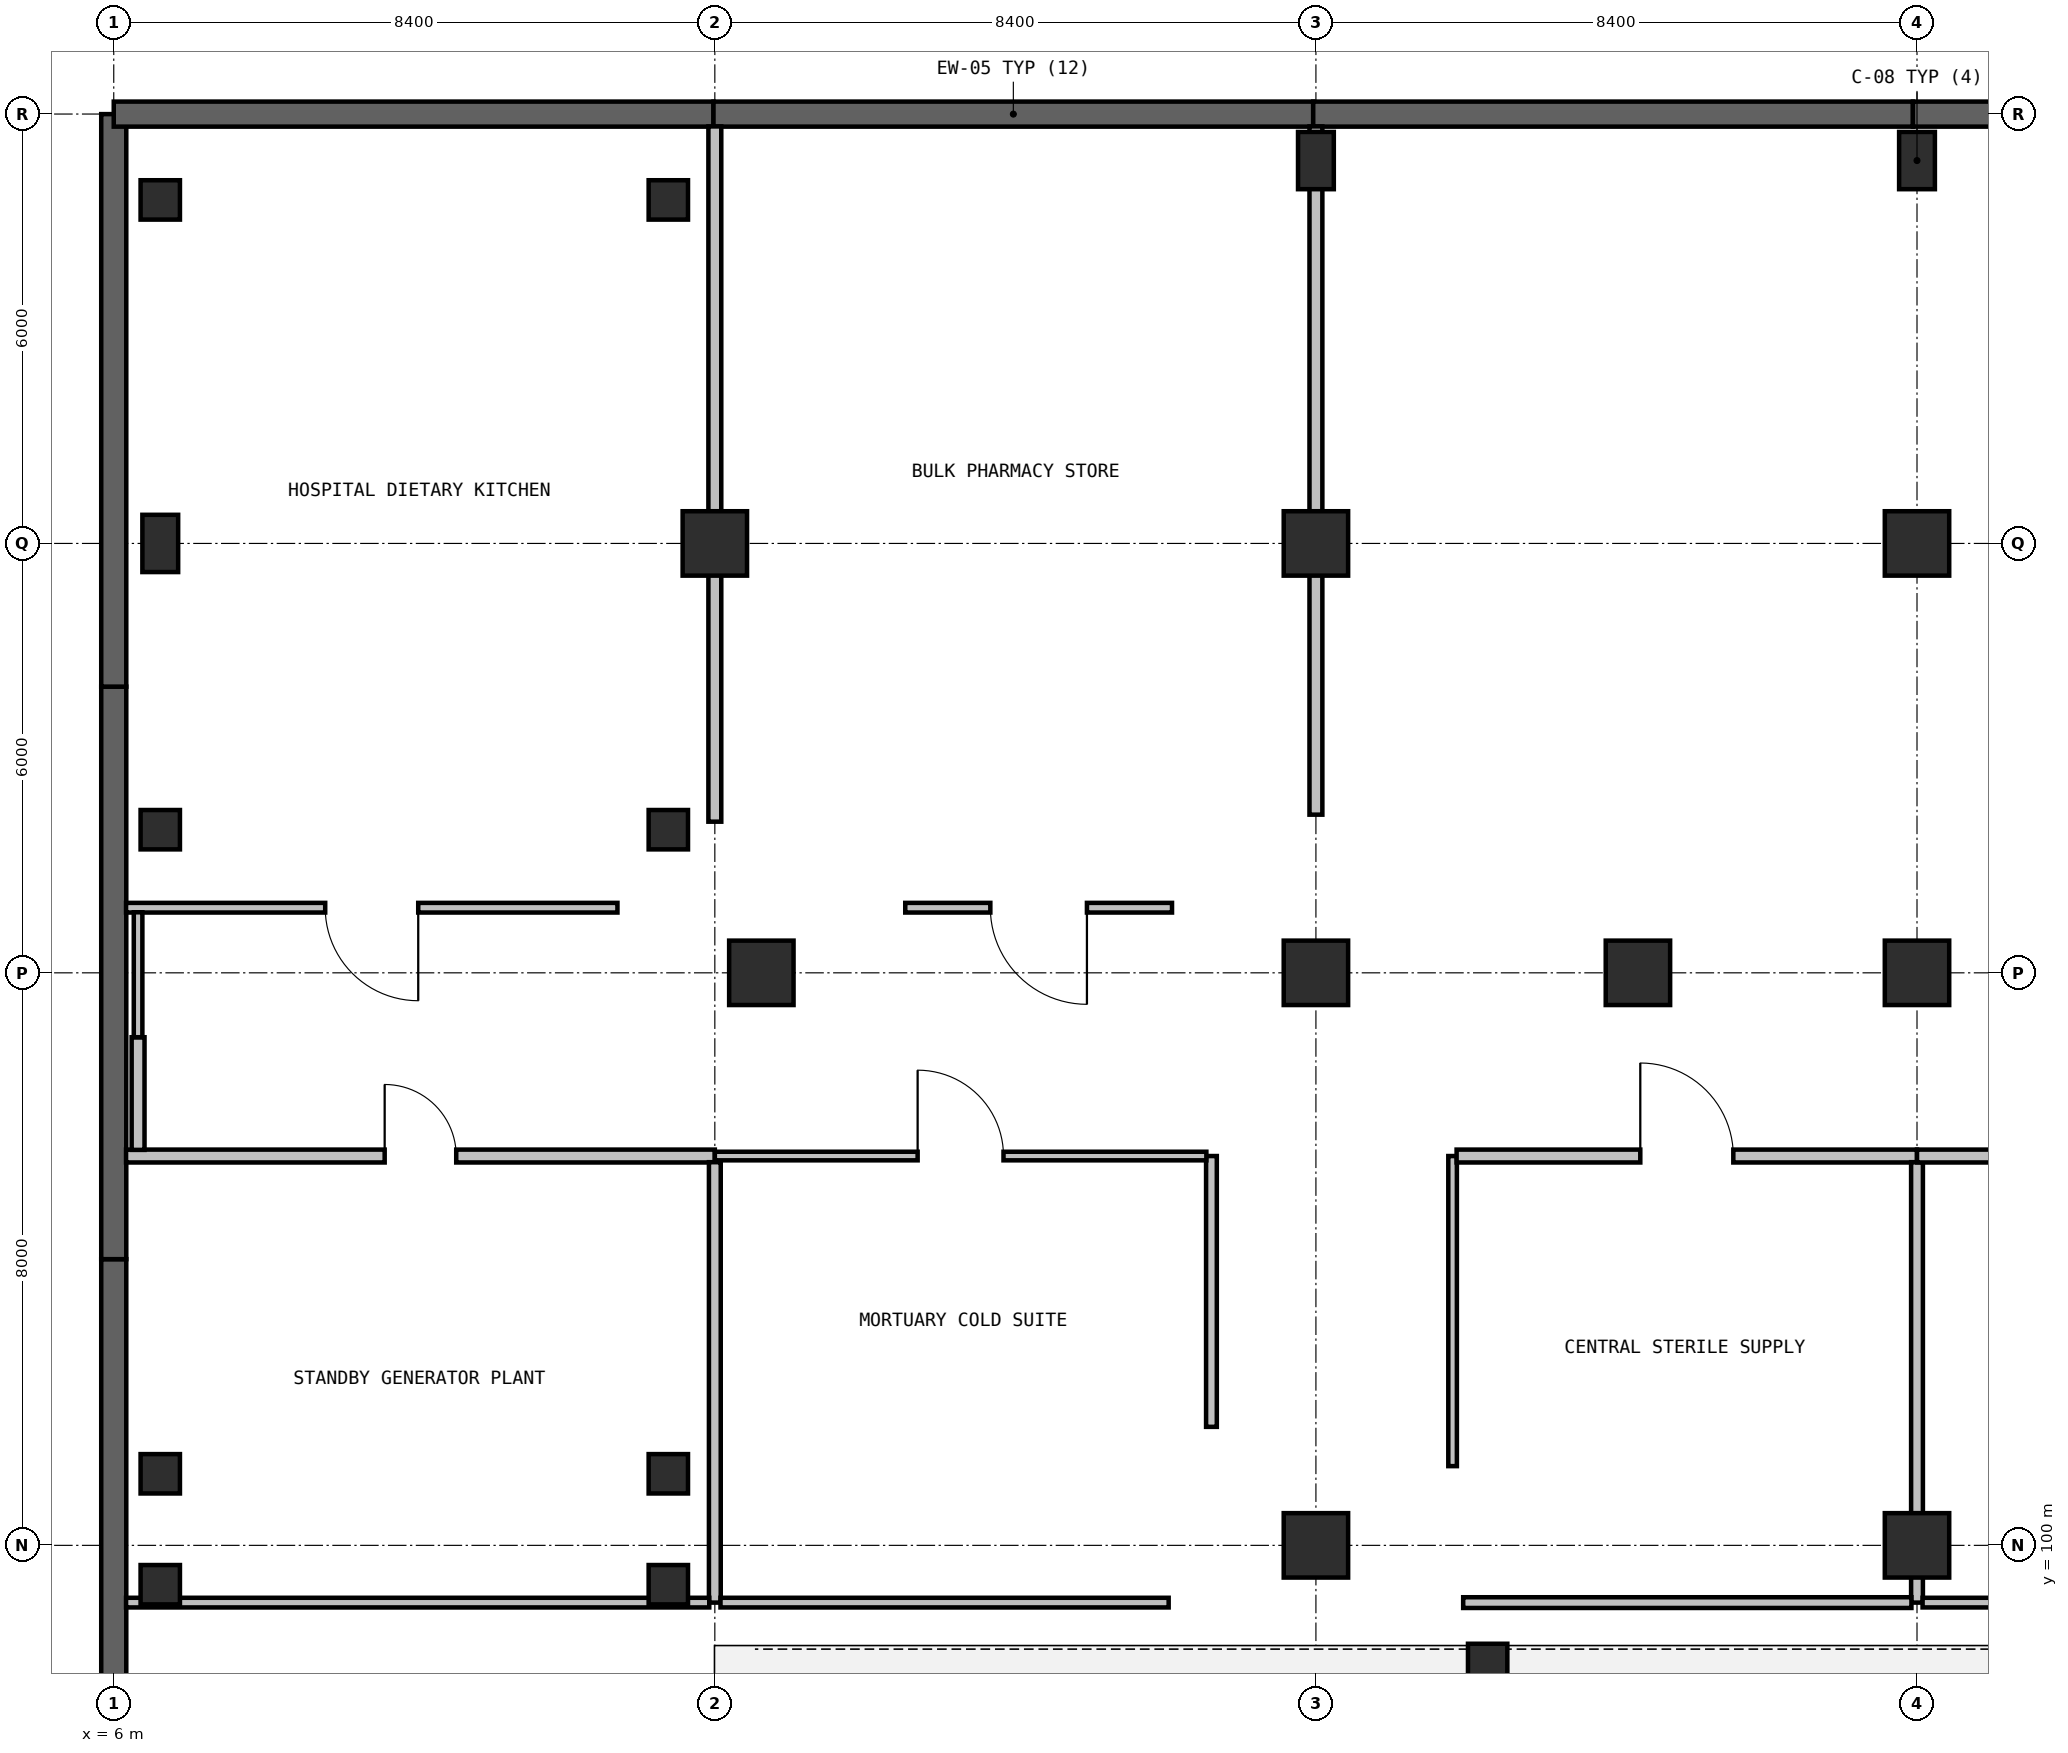
"""IFC4 building model, lengths in metres.
Left out: names, types, materials, properties, quantities, classifications, styles, units other than length and angle.
Written with IfcOpenShell. Run it as: python <this file> out.ifc"""

import sys

from ifc_helpers import new_model, si_unit, direction, frame, frame_2d, origin, origin_2d, place, context, subcontext, project, spatial, rectangle, extrude, element, fill, save


model = new_model("IFC4")
c1 = context("Model", 3, precision=1e-05, world=origin(), true_north=direction((0.0, 1.0)))
c2 = subcontext(c1, "Body", "Model", "MODEL_VIEW")
j1 = project(units=[si_unit("LENGTHUNIT", "METRE"), si_unit("PLANEANGLEUNIT", "RADIAN")], contexts=[c1])
p1 = place(None, origin())
s1 = spatial("IfcSite", under=j1, at=p1, CompositionType="ELEMENT")
p2 = place(p1, origin())
s2 = spatial("IfcBuilding", under=s1, at=p2, CompositionType="ELEMENT")
p3 = place(p2, frame((0.0, 0.0, -4.8)))
s3 = spatial("IfcBuildingStorey", under=s2, at=p3, CompositionType="ELEMENT", Elevation=-4.8)
for number, where, z_axis, x_axis in (
    (1, (6.65, 99.45, 0.0), (0.0, 0.0, 1.0), (1.0, 0.0, 0.0)),
    (2, (6.65, 101.0, 0.0), (0.0, 0.0, 1.0), (1.0, 0.0, 0.0)),
    (3, (6.65, 110.0, 0.0), (0.0, 0.0, 1.0), (1.0, 0.0, 0.0)),
    (4, (6.65, 118.8, 0.0), (0.0, 0.0, 1.0), (1.0, 0.0, 0.0)),
    (5, (13.75, 99.45, 0.0), (0.0, 0.0, 1.0), (1.0, 0.0, 0.0)),
    (6, (13.75, 101.0, 0.0), (0.0, 0.0, 1.0), (1.0, 0.0, 0.0)),
    (7, (13.75, 110.0, 0.0), (0.0, 0.0, 1.0), (1.0, 0.0, 0.0)),
    (8, (13.75, 118.8, 0.0), (0.0, 0.0, 1.0), (1.0, 0.0, 0.0)),
):
    element("IfcColumn", number, at=place(p3, frame(where, z_axis=z_axis, x_axis=x_axis)), inside=s3, PredefinedType="COLUMN", context=c2, shape_type="SweptSolid", body=[
        extrude(rectangle(XDim=0.55, YDim=0.55, at=origin_2d()), origin(), (0.0, 0.0, 1.0), 4.555),
    ])
p4 = place(p3, frame((25.2, 98.35, 0.0), z_axis=(0.0, 0.0, 1.0), x_axis=(1.0, 0.0, 0.0)))
e9 = element("IfcColumn", 9, at=p4, inside=s3, PredefinedType="COLUMN", context=c2, shape_type="SweptSolid", body=[
    extrude(rectangle(XDim=0.55, YDim=0.55, at=origin_2d()), origin(), (0.0, 0.0, 1.0), 2.947),
])
p5 = place(p3, frame((27.3, 108.0, 0.0), z_axis=(0.0, 0.0, 1.0), x_axis=(1.0, 0.0, 0.0)))
e10 = element("IfcColumn", 10, at=p5, inside=s3, PredefinedType="COLUMN", context=c2, shape_type="SweptSolid", body=[
    extrude(rectangle(XDim=0.9, YDim=0.9, at=origin_2d()), origin(), (0.0, 0.0, 1.0), 4.8),
])
p6 = place(p3, frame((6.65, 114.0, 0.0), z_axis=(0.0, 0.0, 1.0), x_axis=(1.0, 0.0, 0.0)))
e11 = element("IfcColumn", 11, at=p6, inside=s3, PredefinedType="COLUMN", context=c2, shape_type="SweptSolid", body=[
    extrude(rectangle(XDim=0.5, YDim=0.8, at=origin_2d()), origin(), (0.0, 0.0, 1.0), 4.555),
])
p7 = place(p3, frame((14.4, 114.0, 0.0), z_axis=(0.0, 0.0, 1.0), x_axis=(1.0, 0.0, 0.0)))
e12 = element("IfcColumn", 12, at=p7, inside=s3, PredefinedType="COLUMN", context=c2, shape_type="SweptSolid", body=[
    extrude(rectangle(XDim=0.9, YDim=0.9, at=origin_2d()), origin(), (0.0, 0.0, 1.0), 4.45),
])
for number, where, z_axis, x_axis in (
    (13, (15.05, 108.0, 0.0), (0.0, 0.0, 1.0), (1.0, 0.0, 0.0)),
    (14, (22.8, 100.0, 0.0), (0.0, 0.0, 1.0), (1.0, 0.0, 0.0)),
    (15, (22.8, 108.0, 0.0), (0.0, 0.0, 1.0), (1.0, 0.0, 0.0)),
    (16, (22.8, 114.0, 0.0), (0.0, 0.0, 1.0), (1.0, 0.0, 0.0)),
):
    element("IfcColumn", number, at=place(p3, frame(where, z_axis=z_axis, x_axis=x_axis)), inside=s3, PredefinedType="COLUMN", context=c2, shape_type="SweptSolid", body=[
        extrude(rectangle(XDim=0.9, YDim=0.9, at=origin_2d()), origin(), (0.0, 0.0, 1.0), 4.8),
    ])
p8 = place(p3, frame((22.8, 119.35, 0.0), z_axis=(0.0, 0.0, 1.0), x_axis=(1.0, 0.0, 0.0)))
e17 = element("IfcColumn", 17, at=p8, inside=s3, PredefinedType="COLUMN", context=c2, shape_type="SweptSolid", body=[
    extrude(rectangle(XDim=0.5, YDim=0.8, at=origin_2d()), origin(), (0.0, 0.0, 1.0), 4.8),
])
for number, where, z_axis, x_axis in (
    (18, (31.2, 100.0, 0.0), (0.0, 0.0, 1.0), (1.0, 0.0, 0.0)),
    (19, (31.2, 108.0, 0.0), (0.0, 0.0, 1.0), (1.0, 0.0, 0.0)),
    (20, (31.2, 114.0, 0.0), (0.0, 0.0, 1.0), (1.0, 0.0, 0.0)),
):
    element("IfcColumn", number, at=place(p3, frame(where, z_axis=z_axis, x_axis=x_axis)), inside=s3, PredefinedType="COLUMN", context=c2, shape_type="SweptSolid", body=[
        extrude(rectangle(XDim=0.9, YDim=0.9, at=origin_2d()), origin(), (0.0, 0.0, 1.0), 4.8),
    ])
p9 = place(p3, frame((31.2, 119.35, 0.0), z_axis=(0.0, 0.0, 1.0), x_axis=(1.0, 0.0, 0.0)))
e21 = element("IfcColumn", 21, at=p9, inside=s3, PredefinedType="COLUMN", context=c2, shape_type="SweptSolid", body=[
    extrude(rectangle(XDim=0.5, YDim=0.8, at=origin_2d()), origin(), (0.0, 0.0, 1.0), 4.8),
])
for number, where, z_axis, x_axis in (
    (22, (6.0, 95.999, 0.0), (0.0, 0.0, 1.0), (0.0, 1.0, 0.0)),
    (23, (6.0, 103.999, 0.0), (0.0, 0.0, 1.0), (0.0, 1.0, 0.0)),
    (24, (6.0, 111.999, 0.0), (0.0, 0.0, 1.0), (0.0, 1.0, 0.0)),
):
    element("IfcWall", number, at=place(p3, frame(where, z_axis=z_axis, x_axis=x_axis)), inside=s3, PredefinedType="SHEAR", context=c2, shape_type="SweptSolid", body=[
        extrude(rectangle(XDim=8.0, YDim=0.35, at=frame_2d((4.0, 0.0))), origin(), (0.0, 0.0, 1.0), 4.45),
    ])
p10 = place(p3, frame((6.0, 119.999, 0.0), z_axis=(0.0, 0.0, 1.0), x_axis=(1.0, 0.0, 0.0)))
e25 = element("IfcWall", 25, at=p10, inside=s3, PredefinedType="SHEAR", context=c2, shape_type="SweptSolid", body=[
    extrude(rectangle(XDim=8.381, YDim=0.35, at=frame_2d((4.19, 0.0))), origin(), (0.0, 0.0, 1.0), 4.45),
])
p11 = place(p3, frame((14.381, 119.999, 0.0), z_axis=(0.0, 0.0, 1.0), x_axis=(1.0, 0.0, 0.0)))
e26 = element("IfcWall", 26, at=p11, inside=s3, PredefinedType="SHEAR", context=c2, shape_type="SweptSolid", body=[
    extrude(rectangle(XDim=8.381, YDim=0.35, at=frame_2d((4.19, 0.0))), origin(), (0.0, 0.0, 1.0), 4.45),
])
p12 = place(p3, frame((22.762, 119.999, 0.0), z_axis=(0.0, 0.0, 1.0), x_axis=(1.0, 0.0, 0.0)))
e27 = element("IfcWall", 27, at=p12, inside=s3, PredefinedType="SHEAR", context=c2, shape_type="SweptSolid", body=[
    extrude(rectangle(XDim=8.381, YDim=0.35, at=frame_2d((4.19, 0.0))), origin(), (0.0, 0.0, 1.0), 4.45),
])
p13 = place(p3, frame((31.143, 119.999, 0.0), z_axis=(0.0, 0.0, 1.0), x_axis=(1.0, 0.0, 0.0)))
e28 = element("IfcWall", 28, at=p13, inside=s3, PredefinedType="SHEAR", context=c2, shape_type="SweptSolid", body=[
    extrude(rectangle(XDim=8.381, YDim=0.35, at=frame_2d((4.19, 0.0))), origin(), (0.0, 0.0, 1.0), 4.45),
])
p14 = place(p3, frame((6.172, 105.44, 0.0), z_axis=(0.0, 0.0, 1.0), x_axis=(1.0, 0.0, 0.0)))
e29 = element("IfcWall", 29, at=p14, inside=s3, PredefinedType="PARTITIONING", context=c2, shape_type="SweptSolid", body=[
    extrude(rectangle(XDim=8.228, YDim=0.18, at=frame_2d((4.114, 0.0))), origin(), (0.0, 0.0, 1.0), 4.45),
])
p15 = place(p14, frame((3.614, 0.0, 0.0)))
e30 = element("IfcOpeningElement", 30, at=p15, cuts=e29, PredefinedType="OPENING", context=c2, shape_type="SweptSolid", body=[
    extrude(rectangle(XDim=1.0, YDim=2.15, at=frame_2d((0.5, 1.075))), frame((0.0, 0.1, 0.0), z_axis=(0.0, -1.0, 0.0), x_axis=(1.0, 0.0, 0.0)), (0.0, 0.0, 1.0), 0.2),
])
p16 = place(p3, frame((14.4, 105.354, 0.0), z_axis=(0.0, 0.0, 1.0), x_axis=(0.0, -1.0, 0.0)))
e31 = element("IfcWall", 31, at=p16, inside=s3, PredefinedType="PARTITIONING", context=c2, shape_type="SweptSolid", body=[
    extrude(rectangle(XDim=6.154, YDim=0.165, at=frame_2d((3.077, 0.0))), origin(), (0.0, 0.0, 1.0), 4.45),
])
p17 = place(p3, frame((14.322, 99.2, 0.0), z_axis=(0.0, 0.0, 1.0), x_axis=(-1.0, 0.0, 0.0)))
e32 = element("IfcWall", 32, at=p17, inside=s3, PredefinedType="PARTITIONING", context=c2, shape_type="SweptSolid", body=[
    extrude(rectangle(XDim=8.15, YDim=0.135, at=frame_2d((4.075, 0.0))), origin(), (0.0, 0.0, 1.0), 3.905),
])
p18 = place(p3, frame((6.34, 107.1, 0.0), z_axis=(0.0, 0.0, 1.0), x_axis=(0.0, -1.0, 0.0)))
e33 = element("IfcWall", 33, at=p18, inside=s3, PredefinedType="PARTITIONING", context=c2, shape_type="SweptSolid", body=[
    extrude(rectangle(XDim=1.574, YDim=0.18, at=frame_2d((0.787, 0.0))), origin(), (0.0, 0.0, 1.0), 3.905),
])
p19 = place(p3, frame((21.34, 105.44, 0.0), z_axis=(0.0, 0.0, 1.0), x_axis=(0.0, -1.0, 0.0)))
e34 = element("IfcWall", 34, at=p19, inside=s3, PredefinedType="PARTITIONING", context=c2, shape_type="SweptSolid", body=[
    extrude(rectangle(XDim=3.784, YDim=0.15, at=frame_2d((1.892, 0.0))), origin(), (0.0, 0.0, 1.0), 4.45),
])
p20 = place(p3, frame((20.742, 99.2, 0.0), z_axis=(0.0, 0.0, 1.0), x_axis=(-1.0, 0.0, 0.0)))
e35 = element("IfcWall", 35, at=p20, inside=s3, PredefinedType="PARTITIONING", context=c2, shape_type="SweptSolid", body=[
    extrude(rectangle(XDim=6.263, YDim=0.135, at=frame_2d((3.131, 0.0))), origin(), (0.0, 0.0, 1.0), 4.45),
])
p21 = place(p3, frame((14.4, 105.44, 0.0), z_axis=(0.0, 0.0, 1.0), x_axis=(1.0, 0.0, 0.0)))
e36 = element("IfcWall", 36, at=p21, inside=s3, PredefinedType="PARTITIONING", context=c2, shape_type="SweptSolid", body=[
    extrude(rectangle(XDim=6.869, YDim=0.12, at=frame_2d((3.435, 0.0))), origin(), (0.0, 0.0, 1.0), 4.45),
])
p22 = place(p21, frame((2.834, 0.0, 0.0)))
e37 = element("IfcOpeningElement", 37, at=p22, cuts=e36, PredefinedType="OPENING", context=c2, shape_type="SweptSolid", body=[
    extrude(rectangle(XDim=1.2, YDim=2.15, at=frame_2d((0.6, 1.075))), frame((0.0, 0.07, 0.0), z_axis=(0.0, -1.0, 0.0), x_axis=(1.0, 0.0, 0.0)), (0.0, 0.0, 1.0), 0.14),
])
p23 = place(p3, frame((24.71, 101.107, 0.0), z_axis=(0.0, 0.0, 1.0), x_axis=(0.0, 1.0, 0.0)))
e38 = element("IfcWall", 38, at=p23, inside=s3, PredefinedType="PARTITIONING", context=c2, shape_type="SweptSolid", body=[
    extrude(rectangle(XDim=4.333, YDim=0.12, at=frame_2d((2.167, 0.0))), origin(), (0.0, 0.0, 1.0), 4.45),
])
p24 = place(p3, frame((24.766, 105.44, 0.0), z_axis=(0.0, 0.0, 1.0), x_axis=(1.0, 0.0, 0.0)))
e39 = element("IfcWall", 39, at=p24, inside=s3, PredefinedType="PARTITIONING", context=c2, shape_type="SweptSolid", body=[
    extrude(rectangle(XDim=6.434, YDim=0.18, at=frame_2d((3.217, 0.0))), origin(), (0.0, 0.0, 1.0), 4.45),
])
p25 = place(p24, frame((2.567, 0.0, 0.0)))
e40 = element("IfcOpeningElement", 40, at=p25, cuts=e39, PredefinedType="OPENING", context=c2, shape_type="SweptSolid", body=[
    extrude(rectangle(XDim=1.3, YDim=2.15, at=frame_2d((0.65, 1.075))), frame((0.0, 0.1, 0.0), z_axis=(0.0, -1.0, 0.0), x_axis=(1.0, 0.0, 0.0)), (0.0, 0.0, 1.0), 0.2),
])
p26 = place(p3, frame((31.2, 105.354, 0.0), z_axis=(0.0, 0.0, 1.0), x_axis=(0.0, -1.0, 0.0)))
e41 = element("IfcWall", 41, at=p26, inside=s3, PredefinedType="PARTITIONING", context=c2, shape_type="SweptSolid", body=[
    extrude(rectangle(XDim=6.154, YDim=0.165, at=frame_2d((3.077, 0.0))), origin(), (0.0, 0.0, 1.0), 3.7),
])
p27 = place(p3, frame((31.122, 99.2, 0.0), z_axis=(0.0, 0.0, 1.0), x_axis=(-1.0, 0.0, 0.0)))
e42 = element("IfcWall", 42, at=p27, inside=s3, PredefinedType="PARTITIONING", context=c2, shape_type="SweptSolid", body=[
    extrude(rectangle(XDim=6.264, YDim=0.15, at=frame_2d((3.132, 0.0))), origin(), (0.0, 0.0, 1.0), 4.45),
])
p28 = place(p3, frame((39.522, 99.2, 0.0), z_axis=(0.0, 0.0, 1.0), x_axis=(-1.0, 0.0, 0.0)))
e43 = element("IfcWall", 43, at=p28, inside=s3, PredefinedType="PARTITIONING", context=c2, shape_type="SweptSolid", body=[
    extrude(rectangle(XDim=8.244, YDim=0.135, at=frame_2d((4.122, 0.0))), origin(), (0.0, 0.0, 1.0), 4.45),
])
p29 = place(p3, frame((31.2, 105.44, 0.0), z_axis=(0.0, 0.0, 1.0), x_axis=(1.0, 0.0, 0.0)))
e44 = element("IfcWall", 44, at=p29, inside=s3, PredefinedType="PARTITIONING", context=c2, shape_type="SweptSolid", body=[
    extrude(rectangle(XDim=8.322, YDim=0.18, at=frame_2d((4.161, 0.0))), origin(), (0.0, 0.0, 1.0), 4.45),
])
p30 = place(p29, frame((3.461, 0.0, 0.0)))
e45 = element("IfcOpeningElement", 45, at=p30, cuts=e44, PredefinedType="OPENING", context=c2, shape_type="SweptSolid", body=[
    extrude(rectangle(XDim=1.4, YDim=2.15, at=frame_2d((0.7, 1.075))), frame((0.0, 0.1, 0.0), z_axis=(0.0, -1.0, 0.0), x_axis=(1.0, 0.0, 0.0)), (0.0, 0.0, 1.0), 0.2),
])
p31 = place(p3, frame((13.039, 108.91, 0.0), z_axis=(0.0, 0.0, 1.0), x_axis=(-1.0, 0.0, 0.0)))
e46 = element("IfcWall", 46, at=p31, inside=s3, PredefinedType="PARTITIONING", context=c2, shape_type="SweptSolid", body=[
    extrude(rectangle(XDim=6.867, YDim=0.135, at=frame_2d((3.434, 0.0))), origin(), (0.0, 0.0, 1.0), 4.45),
])
p32 = place(p31, frame((2.784, 0.0, 0.0)))
e47 = element("IfcOpeningElement", 47, at=p32, cuts=e46, PredefinedType="OPENING", context=c2, shape_type="SweptSolid", body=[
    extrude(rectangle(XDim=1.3, YDim=2.15, at=frame_2d((0.65, 1.075))), frame((0.0, 0.077, 0.0), z_axis=(0.0, -1.0, 0.0), x_axis=(1.0, 0.0, 0.0)), (0.0, 0.0, 1.0), 0.155),
])
p33 = place(p3, frame((6.34, 108.846, 0.0), z_axis=(0.0, 0.0, 1.0), x_axis=(0.0, -1.0, 0.0)))
e48 = element("IfcWall", 48, at=p33, inside=s3, PredefinedType="PARTITIONING", context=c2, shape_type="SweptSolid", body=[
    extrude(rectangle(XDim=1.746, YDim=0.12, at=frame_2d((0.873, 0.0))), origin(), (0.0, 0.0, 1.0), 4.45),
])
p34 = place(p3, frame((14.4, 119.827, 0.0), z_axis=(0.0, 0.0, 1.0), x_axis=(0.0, -1.0, 0.0)))
e49 = element("IfcWall", 49, at=p34, inside=s3, PredefinedType="PARTITIONING", context=c2, shape_type="SweptSolid", body=[
    extrude(rectangle(XDim=9.715, YDim=0.18, at=frame_2d((4.857, 0.0))), origin(), (0.0, 0.0, 1.0), 4.45),
])
p35 = place(p3, frame((20.789, 108.91, 0.0), z_axis=(0.0, 0.0, 1.0), x_axis=(-1.0, 0.0, 0.0)))
e50 = element("IfcWall", 50, at=p35, inside=s3, PredefinedType="PARTITIONING", context=c2, shape_type="SweptSolid", body=[
    extrude(rectangle(XDim=3.728, YDim=0.135, at=frame_2d((1.864, 0.0))), origin(), (0.0, 0.0, 1.0), 4.45),
])
p36 = place(p35, frame((1.189, 0.0, 0.0)))
e51 = element("IfcOpeningElement", 51, at=p36, cuts=e50, PredefinedType="OPENING", context=c2, shape_type="SweptSolid", body=[
    extrude(rectangle(XDim=1.35, YDim=2.15, at=frame_2d((0.675, 1.075))), frame((0.0, 0.077, 0.0), z_axis=(0.0, -1.0, 0.0), x_axis=(1.0, 0.0, 0.0)), (0.0, 0.0, 1.0), 0.155),
])
p37 = place(p3, frame((22.8, 119.827, 0.0), z_axis=(0.0, 0.0, 1.0), x_axis=(0.0, -1.0, 0.0)))
e52 = element("IfcWall", 52, at=p37, inside=s3, PredefinedType="PARTITIONING", context=c2, shape_type="SweptSolid", body=[
    extrude(rectangle(XDim=9.617, YDim=0.18, at=frame_2d((4.809, 0.0))), origin(), (0.0, 0.0, 1.0), 3.7),
])
p38 = place(p15, origin())
e53 = element("IfcDoor", 53, at=p38, inside=s3, OperationType="SINGLE_SWING_RIGHT", PredefinedType="DOOR", context=c2, shape_type="SweptSolid", body=[
    extrude(rectangle(XDim=1.0, YDim=2.15, at=frame_2d((0.5, 1.075))), frame((0.0, 0.025, 0.0), z_axis=(0.0, -1.0, 0.0), x_axis=(1.0, 0.0, 0.0)), (0.0, 0.0, 1.0), 0.05),
])
fill(e30, e53)
p39 = place(p22, origin())
e54 = element("IfcDoor", 54, at=p39, inside=s3, OperationType="SINGLE_SWING_RIGHT", PredefinedType="DOOR", context=c2, shape_type="SweptSolid", body=[
    extrude(rectangle(XDim=1.2, YDim=2.15, at=frame_2d((0.6, 1.075))), frame((0.0, 0.025, 0.0), z_axis=(0.0, -1.0, 0.0), x_axis=(1.0, 0.0, 0.0)), (0.0, 0.0, 1.0), 0.05),
])
fill(e37, e54)
p40 = place(p25, origin())
e55 = element("IfcDoor", 55, at=p40, inside=s3, OperationType="SINGLE_SWING_RIGHT", PredefinedType="DOOR", context=c2, shape_type="SweptSolid", body=[
    extrude(rectangle(XDim=1.3, YDim=2.15, at=frame_2d((0.65, 1.075))), frame((0.0, 0.025, 0.0), z_axis=(0.0, -1.0, 0.0), x_axis=(1.0, 0.0, 0.0)), (0.0, 0.0, 1.0), 0.05),
])
fill(e40, e55)
p41 = place(p32, origin())
e56 = element("IfcDoor", 56, at=p41, inside=s3, OperationType="SINGLE_SWING_RIGHT", PredefinedType="DOOR", context=c2, shape_type="SweptSolid", body=[
    extrude(rectangle(XDim=1.3, YDim=2.15, at=frame_2d((0.65, 1.075))), frame((0.0, 0.025, 0.0), z_axis=(0.0, -1.0, 0.0), x_axis=(1.0, 0.0, 0.0)), (0.0, 0.0, 1.0), 0.05),
])
fill(e47, e56)
p42 = place(p36, origin())
e57 = element("IfcDoor", 57, at=p42, inside=s3, OperationType="SINGLE_SWING_LEFT", PredefinedType="DOOR", context=c2, shape_type="SweptSolid", body=[
    extrude(rectangle(XDim=1.35, YDim=2.15, at=frame_2d((0.675, 1.075))), frame((0.0, 0.025, 0.0), z_axis=(0.0, -1.0, 0.0), x_axis=(1.0, 0.0, 0.0)), (0.0, 0.0, 1.0), 0.05),
])
fill(e51, e57)
save(model, sys.argv[1])
